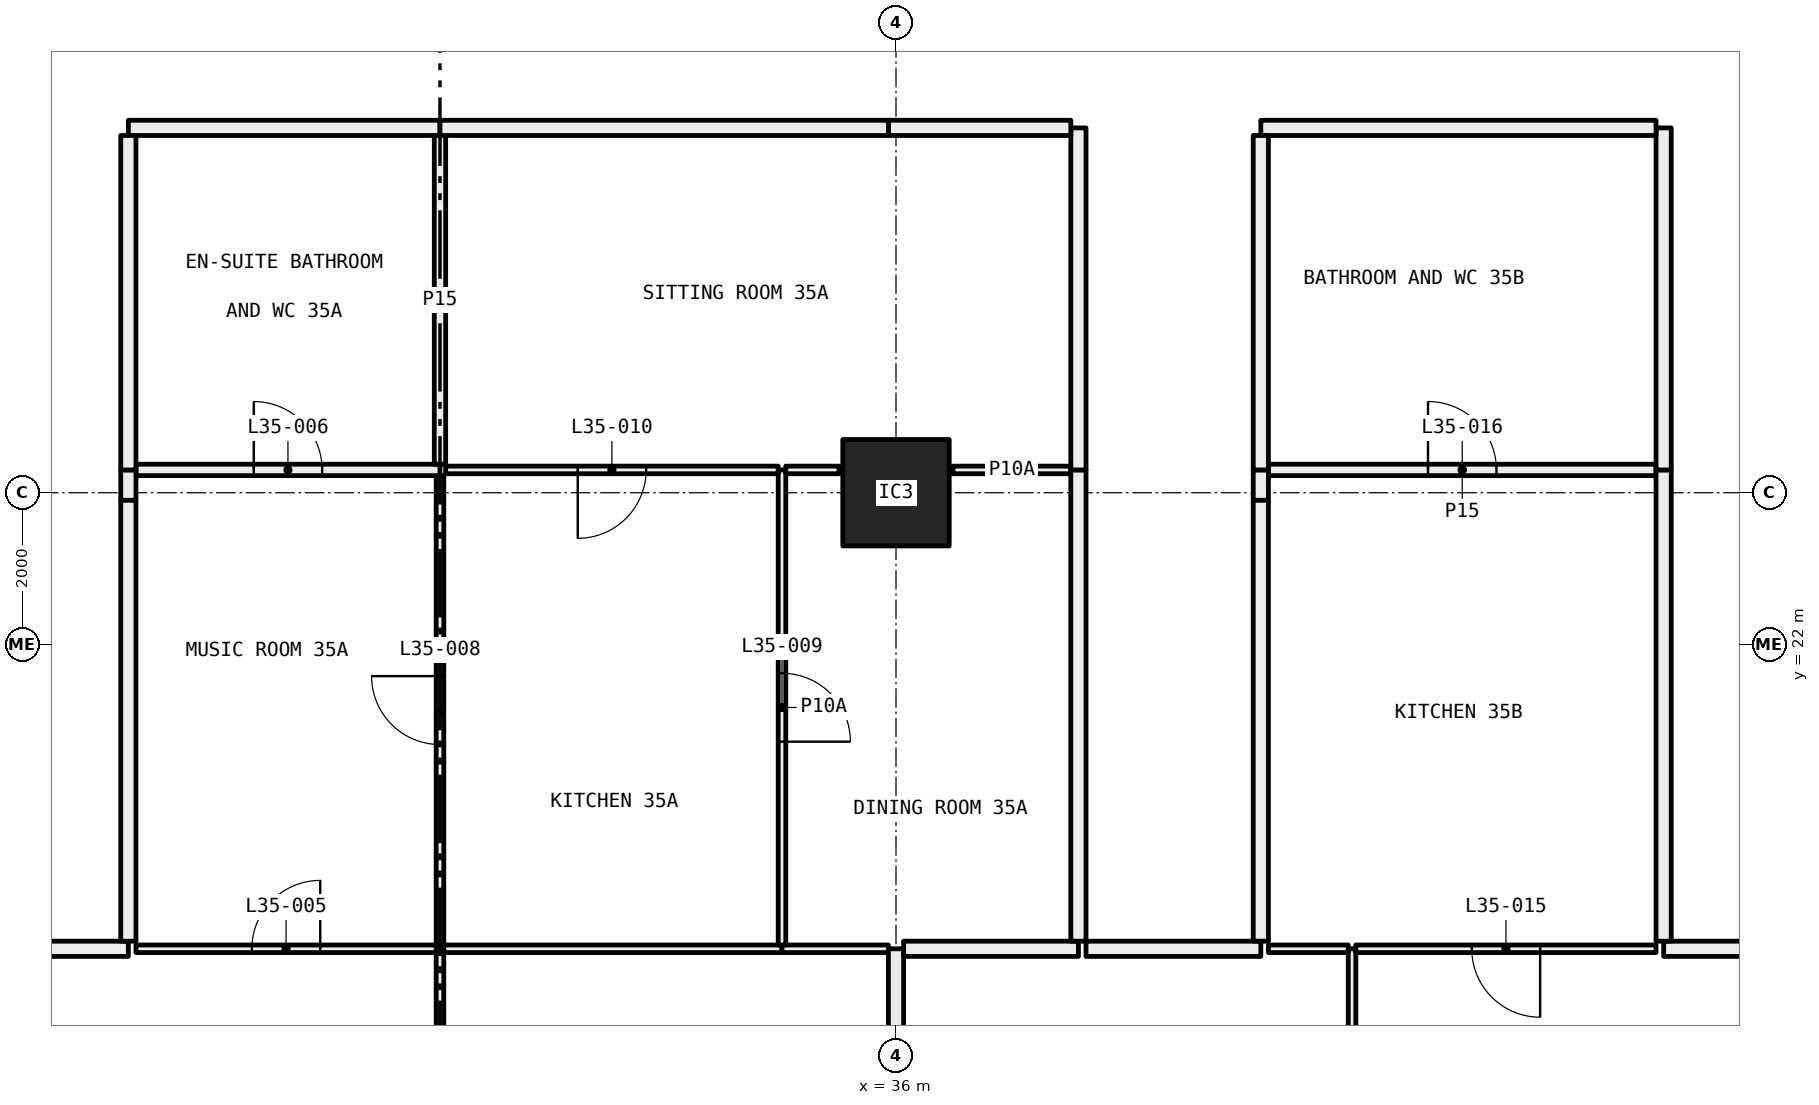
"""IFC4 building model, lengths in metres.
Left out: names, types, materials, properties, quantities, classifications, styles, units other than length and angle.
Written with IfcOpenShell. Run it as: python <this file> out.ifc"""

import sys

from ifc_helpers import new_model, si_unit, direction, frame, frame_2d, origin, origin_2d, place, context, subcontext, project, spatial, rectangle, hollow_rectangle, extrude, element, fill, save


model = new_model("IFC4")
c1 = context("Model", 3, precision=1e-05, world=origin(), true_north=direction((0.0, 1.0)))
c2 = subcontext(c1, "Body", "Model", "MODEL_VIEW")
j1 = project(units=[si_unit("LENGTHUNIT", "METRE"), si_unit("PLANEANGLEUNIT", "RADIAN")], contexts=[c1])
p1 = place(None, origin())
s1 = spatial("IfcSite", under=j1, at=p1, CompositionType="ELEMENT")
p2 = place(p1, origin())
s2 = spatial("IfcBuilding", under=s1, at=p2, CompositionType="ELEMENT")
p3 = place(p2, frame((0.0, 0.0, 134.55)))
s3 = spatial("IfcBuildingStorey", under=s2, at=p3, CompositionType="ELEMENT", Elevation=134.55)
p4 = place(p3, frame((36.0, 24.0, 0.0), z_axis=(0.0, 0.0, 1.0), x_axis=(1.0, 0.0, 0.0)))
e1 = element("IfcColumn", 1, at=p4, inside=s3, PredefinedType="COLUMN", context=c2, shape_type="SweptSolid", body=[
    extrude(hollow_rectangle(XDim=1.4, YDim=1.4, WallThickness=0.06, at=origin_2d()), origin(), (0.0, 0.0, 1.0), 3.05),
])
p5 = place(p3, frame((30.0, 12.72, 0.0), z_axis=(0.0, 0.0, 1.0), x_axis=(0.0, 1.0, 0.0)))
e2 = element("IfcWall", 2, at=p5, inside=s3, PredefinedType="PARTITIONING", context=c2, shape_type="SweptSolid", body=[
    extrude(rectangle(XDim=5.28, YDim=0.1, at=frame_2d((2.64, 0.0))), origin(), (0.0, 0.0, 1.0), 3.05),
])
p6 = place(p5, frame((2.19, 0.0, 0.0)))
e3 = element("IfcOpeningElement", 3, at=p6, cuts=e2, PredefinedType="OPENING", context=c2, shape_type="SweptSolid", body=[
    extrude(rectangle(XDim=0.9, YDim=2.1, at=frame_2d((0.45, 1.05))), frame((0.0, 0.06, 0.0), z_axis=(0.0, -1.0, 0.0), x_axis=(1.0, 0.0, 0.0)), (0.0, 0.0, 1.0), 0.12),
])
p7 = place(p3, frame((29.95, 18.0, 0.0), z_axis=(0.0, 0.0, 1.0), x_axis=(-1.0, 0.0, 0.0)))
e4 = element("IfcWall", 4, at=p7, inside=s3, PredefinedType="PARTITIONING", context=c2, shape_type="SweptSolid", body=[
    extrude(rectangle(XDim=3.95, YDim=0.1, at=frame_2d((1.975, 0.0))), origin(), (0.0, 0.0, 1.0), 3.05),
])
p8 = place(p7, frame((1.525, 0.0, 0.0)))
e5 = element("IfcOpeningElement", 5, at=p8, cuts=e4, PredefinedType="OPENING", context=c2, shape_type="SweptSolid", body=[
    extrude(rectangle(XDim=0.9, YDim=2.1, at=frame_2d((0.45, 1.05))), frame((0.0, 0.06, 0.0), z_axis=(0.0, -1.0, 0.0), x_axis=(1.0, 0.0, 0.0)), (0.0, 0.0, 1.0), 0.12),
])
p9 = place(p3, frame((25.9, 18.0, 0.0), z_axis=(0.0, 0.0, 1.0), x_axis=(-1.0, 0.0, 0.0)))
e6 = element("IfcWall", 6, at=p9, inside=s3, PredefinedType="PARTITIONING", context=c2, shape_type="SweptSolid", body=[
    extrude(rectangle(XDim=1.9, YDim=0.2, at=frame_2d((0.95, 0.0))), origin(), (0.0, 0.0, 1.0), 3.05),
])
p10 = place(p3, frame((34.5, 18.0, 0.0), z_axis=(0.0, 0.0, 1.0), x_axis=(-1.0, 0.0, 0.0)))
e7 = element("IfcWall", 7, at=p10, inside=s3, PredefinedType="PARTITIONING", context=c2, shape_type="SweptSolid", body=[
    extrude(rectangle(XDim=4.45, YDim=0.1, at=frame_2d((2.225, 0.0))), origin(), (0.0, 0.0, 1.0), 3.05),
])
p11 = place(p3, frame((35.9, 18.0, 0.0), z_axis=(0.0, 0.0, 1.0), x_axis=(-1.0, 0.0, 0.0)))
e8 = element("IfcWall", 8, at=p11, inside=s3, PredefinedType="PARTITIONING", context=c2, shape_type="SweptSolid", body=[
    extrude(rectangle(XDim=1.4, YDim=0.1, at=frame_2d((0.7, 0.0))), origin(), (0.0, 0.0, 1.0), 3.05),
])
p12 = place(p3, frame((36.0, 12.72, 0.0), z_axis=(0.0, 0.0, 1.0), x_axis=(0.0, 1.0, 0.0)))
e9 = element("IfcWall", 9, at=p12, inside=s3, PredefinedType="PARTITIONING", context=c2, shape_type="SweptSolid", body=[
    extrude(rectangle(XDim=5.28, YDim=0.2, at=frame_2d((2.64, 0.0))), origin(), (0.0, 0.0, 1.0), 2.45),
])
p13 = place(p3, frame((30.0, 18.05, 0.0), z_axis=(0.0, 0.0, 1.0), x_axis=(0.0, 1.0, 0.0)))
e10 = element("IfcWall", 10, at=p13, inside=s3, PredefinedType="PARTITIONING", context=c2, shape_type="SweptSolid", body=[
    extrude(rectangle(XDim=6.175, YDim=0.1, at=frame_2d((3.087, 0.0))), origin(), (0.0, 0.0, 1.0), 2.45),
])
p14 = place(p13, frame((2.637, 0.0, 0.0)))
e11 = element("IfcOpeningElement", 11, at=p14, cuts=e10, PredefinedType="OPENING", context=c2, shape_type="SweptSolid", body=[
    extrude(rectangle(XDim=0.9, YDim=2.1, at=frame_2d((0.45, 1.05))), frame((0.0, 0.06, 0.0), z_axis=(0.0, -1.0, 0.0), x_axis=(1.0, 0.0, 0.0)), (0.0, 0.0, 1.0), 0.12),
])
p15 = place(p3, frame((30.0, 24.3, 0.0), z_axis=(0.0, 0.0, 1.0), x_axis=(-1.0, 0.0, 0.0)))
e12 = element("IfcWall", 12, at=p15, inside=s3, PredefinedType="PARTITIONING", context=c2, shape_type="SweptSolid", body=[
    extrude(rectangle(XDim=4.0, YDim=0.15, at=frame_2d((2.0, 0.0))), origin(), (0.0, 0.0, 1.0), 3.05),
])
p16 = place(p15, frame((1.55, 0.0, 0.0)))
e13 = element("IfcOpeningElement", 13, at=p16, cuts=e12, PredefinedType="OPENING", context=c2, shape_type="SweptSolid", body=[
    extrude(rectangle(XDim=0.9, YDim=2.1, at=frame_2d((0.45, 1.05))), frame((0.0, 0.085, 0.0), z_axis=(0.0, -1.0, 0.0), x_axis=(1.0, 0.0, 0.0)), (0.0, 0.0, 1.0), 0.17),
])
p17 = place(p3, frame((25.9, 24.3, 0.0), z_axis=(0.0, 0.0, 1.0), x_axis=(0.0, -1.0, 0.0)))
e14 = element("IfcWall", 14, at=p17, inside=s3, PredefinedType="PARTITIONING", context=c2, shape_type="SweptSolid", body=[
    extrude(rectangle(XDim=0.4, YDim=0.2, at=frame_2d((0.2, 0.0))), origin(), (0.0, 0.0, 1.0), 2.45),
])
p18 = place(p3, frame((25.9, 23.9, 0.0), z_axis=(0.0, 0.0, 1.0), x_axis=(0.0, -1.0, 0.0)))
e15 = element("IfcWall", 15, at=p18, inside=s3, PredefinedType="PARTITIONING", context=c2, shape_type="SweptSolid", body=[
    extrude(rectangle(XDim=5.8, YDim=0.2, at=frame_2d((2.9, 0.0))), origin(), (0.0, 0.0, 1.0), 3.05),
])
p19 = place(p3, frame((34.5, 18.05, 0.0), z_axis=(0.0, 0.0, 1.0), x_axis=(0.0, 1.0, 0.0)))
e16 = element("IfcWall", 16, at=p19, inside=s3, PredefinedType="PARTITIONING", context=c2, shape_type="SweptSolid", body=[
    extrude(rectangle(XDim=6.25, YDim=0.1, at=frame_2d((3.125, 0.0))), origin(), (0.0, 0.0, 1.0), 2.45),
])
p20 = place(p19, frame((2.675, 0.0, 0.0)))
e17 = element("IfcOpeningElement", 17, at=p20, cuts=e16, PredefinedType="OPENING", context=c2, shape_type="SweptSolid", body=[
    extrude(rectangle(XDim=0.9, YDim=2.1, at=frame_2d((0.45, 1.05))), frame((0.0, 0.06, 0.0), z_axis=(0.0, -1.0, 0.0), x_axis=(1.0, 0.0, 0.0)), (0.0, 0.0, 1.0), 0.12),
])
p21 = place(p3, frame((34.45, 24.3, 0.0), z_axis=(0.0, 0.0, 1.0), x_axis=(-1.0, 0.0, 0.0)))
e18 = element("IfcWall", 18, at=p21, inside=s3, PredefinedType="PARTITIONING", context=c2, shape_type="SweptSolid", body=[
    extrude(rectangle(XDim=4.375, YDim=0.1, at=frame_2d((2.188, 0.0))), origin(), (0.0, 0.0, 1.0), 3.05),
])
p22 = place(p21, frame((1.738, 0.0, 0.0)))
e19 = element("IfcOpeningElement", 19, at=p22, cuts=e18, PredefinedType="OPENING", context=c2, shape_type="SweptSolid", body=[
    extrude(rectangle(XDim=0.9, YDim=2.1, at=frame_2d((0.45, 1.05))), frame((0.0, 0.06, 0.0), z_axis=(0.0, -1.0, 0.0), x_axis=(1.0, 0.0, 0.0)), (0.0, 0.0, 1.0), 0.12),
])
p23 = place(p3, frame((35.25, 24.3, 0.0), z_axis=(0.0, 0.0, 1.0), x_axis=(-1.0, 0.0, 0.0)))
e20 = element("IfcWall", 20, at=p23, inside=s3, PredefinedType="PARTITIONING", context=c2, shape_type="SweptSolid", body=[
    extrude(rectangle(XDim=0.7, YDim=0.1, at=frame_2d((0.35, 0.0))), origin(), (0.0, 0.0, 1.0), 3.05),
])
p24 = place(p3, frame((38.3, 24.3, 0.0), z_axis=(0.0, 0.0, 1.0), x_axis=(-1.0, 0.0, 0.0)))
e21 = element("IfcWall", 21, at=p24, inside=s3, PredefinedType="PARTITIONING", context=c2, shape_type="SweptSolid", body=[
    extrude(rectangle(XDim=1.55, YDim=0.1, at=frame_2d((0.775, 0.0))), origin(), (0.0, 0.0, 1.0), 3.05),
])
p25 = place(p3, frame((36.1, 18.0, 0.0), z_axis=(0.0, 0.0, 1.0), x_axis=(1.0, 0.0, 0.0)))
e22 = element("IfcWall", 22, at=p25, inside=s3, PredefinedType="PARTITIONING", context=c2, shape_type="SweptSolid", body=[
    extrude(rectangle(XDim=2.3, YDim=0.2, at=frame_2d((1.15, 0.0))), origin(), (0.0, 0.0, 1.0), 3.05),
])
p26 = place(p3, frame((38.4, 18.1, 0.0), z_axis=(0.0, 0.0, 1.0), x_axis=(0.0, 1.0, 0.0)))
e23 = element("IfcWall", 23, at=p26, inside=s3, PredefinedType="PARTITIONING", context=c2, shape_type="SweptSolid", body=[
    extrude(rectangle(XDim=6.2, YDim=0.2, at=frame_2d((3.1, 0.0))), origin(), (0.0, 0.0, 1.0), 2.45),
])
p27 = place(p3, frame((30.0, 24.375, 0.0), z_axis=(0.0, 0.0, 1.0), x_axis=(0.0, 1.0, 0.0)))
e24 = element("IfcWall", 24, at=p27, inside=s3, PredefinedType="PARTITIONING", context=c2, shape_type="SweptSolid", body=[
    extrude(rectangle(XDim=4.325, YDim=0.15, at=frame_2d((2.163, 0.0))), origin(), (0.0, 0.0, 1.0), 3.05),
])
p28 = place(p3, frame((30.0, 28.8, 0.0), z_axis=(0.0, 0.0, 1.0), x_axis=(-1.0, 0.0, 0.0)))
e25 = element("IfcWall", 25, at=p28, inside=s3, PredefinedType="PARTITIONING", context=c2, shape_type="SweptSolid", body=[
    extrude(rectangle(XDim=4.1, YDim=0.2, at=frame_2d((2.05, 0.0))), origin(), (0.0, 0.0, 1.0), 3.05),
])
p29 = place(p3, frame((25.9, 28.7, 0.0), z_axis=(0.0, 0.0, 1.0), x_axis=(0.0, -1.0, 0.0)))
e26 = element("IfcWall", 26, at=p29, inside=s3, PredefinedType="PARTITIONING", context=c2, shape_type="SweptSolid", body=[
    extrude(rectangle(XDim=4.4, YDim=0.2, at=frame_2d((2.2, 0.0))), origin(), (0.0, 0.0, 1.0), 3.05),
])
p30 = place(p3, frame((38.4, 24.3, 0.0), z_axis=(0.0, 0.0, 1.0), x_axis=(0.0, 1.0, 0.0)))
e27 = element("IfcWall", 27, at=p30, inside=s3, PredefinedType="PARTITIONING", context=c2, shape_type="SweptSolid", body=[
    extrude(rectangle(XDim=4.5, YDim=0.2, at=frame_2d((2.25, 0.0))), origin(), (0.0, 0.0, 1.0), 3.05),
])
p31 = place(p3, frame((38.3, 28.8, 0.0), z_axis=(0.0, 0.0, 1.0), x_axis=(-1.0, 0.0, 0.0)))
e28 = element("IfcWall", 28, at=p31, inside=s3, PredefinedType="PARTITIONING", context=c2, shape_type="SweptSolid", body=[
    extrude(rectangle(XDim=2.4, YDim=0.2, at=frame_2d((1.2, 0.0))), origin(), (0.0, 0.0, 1.0), 2.45),
])
p32 = place(p3, frame((35.9, 28.8, 0.0), z_axis=(0.0, 0.0, 1.0), x_axis=(-1.0, 0.0, 0.0)))
e29 = element("IfcWall", 29, at=p32, inside=s3, PredefinedType="PARTITIONING", context=c2, shape_type="SweptSolid", body=[
    extrude(rectangle(XDim=5.9, YDim=0.2, at=frame_2d((2.95, 0.0))), origin(), (0.0, 0.0, 1.0), 3.05),
])
p33 = place(p3, frame((42.0, 12.72, 0.0), z_axis=(0.0, 0.0, 1.0), x_axis=(0.0, 1.0, 0.0)))
e30 = element("IfcWall", 30, at=p33, inside=s3, PredefinedType="PARTITIONING", context=c2, shape_type="SweptSolid", body=[
    extrude(rectangle(XDim=5.28, YDim=0.1, at=frame_2d((2.64, 0.0))), origin(), (0.0, 0.0, 1.0), 3.05),
])
p34 = place(p33, frame((2.19, 0.0, 0.0)))
e31 = element("IfcOpeningElement", 31, at=p34, cuts=e30, PredefinedType="OPENING", context=c2, shape_type="SweptSolid", body=[
    extrude(rectangle(XDim=0.9, YDim=2.1, at=frame_2d((0.45, 1.05))), frame((0.0, 0.06, 0.0), z_axis=(0.0, -1.0, 0.0), x_axis=(1.0, 0.0, 0.0)), (0.0, 0.0, 1.0), 0.12),
])
p35 = place(p3, frame((41.95, 18.0, 0.0), z_axis=(0.0, 0.0, 1.0), x_axis=(-1.0, 0.0, 0.0)))
e32 = element("IfcWall", 32, at=p35, inside=s3, PredefinedType="PARTITIONING", context=c2, shape_type="SweptSolid", body=[
    extrude(rectangle(XDim=1.05, YDim=0.1, at=frame_2d((0.525, 0.0))), origin(), (0.0, 0.0, 1.0), 3.05),
])
p36 = place(p3, frame((40.8, 18.0, 0.0), z_axis=(0.0, 0.0, 1.0), x_axis=(-1.0, 0.0, 0.0)))
e33 = element("IfcWall", 33, at=p36, inside=s3, PredefinedType="PARTITIONING", context=c2, shape_type="SweptSolid", body=[
    extrude(rectangle(XDim=2.3, YDim=0.2, at=frame_2d((1.15, 0.0))), origin(), (0.0, 0.0, 1.0), 3.05),
])
p37 = place(p3, frame((46.0, 18.0, 0.0), z_axis=(0.0, 0.0, 1.0), x_axis=(-1.0, 0.0, 0.0)))
e34 = element("IfcWall", 34, at=p37, inside=s3, PredefinedType="PARTITIONING", context=c2, shape_type="SweptSolid", body=[
    extrude(rectangle(XDim=3.95, YDim=0.1, at=frame_2d((1.975, 0.0))), origin(), (0.0, 0.0, 1.0), 3.05),
])
p38 = place(p37, frame((1.525, 0.0, 0.0)))
e35 = element("IfcOpeningElement", 35, at=p38, cuts=e34, PredefinedType="OPENING", context=c2, shape_type="SweptSolid", body=[
    extrude(rectangle(XDim=0.9, YDim=2.1, at=frame_2d((0.45, 1.05))), frame((0.0, 0.06, 0.0), z_axis=(0.0, -1.0, 0.0), x_axis=(1.0, 0.0, 0.0)), (0.0, 0.0, 1.0), 0.12),
])
p39 = place(p3, frame((48.0, 18.0, 0.0), z_axis=(0.0, 0.0, 1.0), x_axis=(-1.0, 0.0, 0.0)))
e36 = element("IfcWall", 36, at=p39, inside=s3, PredefinedType="PARTITIONING", context=c2, shape_type="SweptSolid", body=[
    extrude(rectangle(XDim=1.9, YDim=0.2, at=frame_2d((0.95, 0.0))), origin(), (0.0, 0.0, 1.0), 3.05),
])
p40 = place(p3, frame((46.0, 24.3, 0.0), z_axis=(0.0, 0.0, 1.0), x_axis=(-1.0, 0.0, 0.0)))
e37 = element("IfcWall", 37, at=p40, inside=s3, PredefinedType="PARTITIONING", context=c2, shape_type="SweptSolid", body=[
    extrude(rectangle(XDim=5.1, YDim=0.15, at=frame_2d((2.55, 0.0))), origin(), (0.0, 0.0, 1.0), 3.05),
])
p41 = place(p40, frame((2.1, 0.0, 0.0)))
e38 = element("IfcOpeningElement", 38, at=p41, cuts=e37, PredefinedType="OPENING", context=c2, shape_type="SweptSolid", body=[
    extrude(rectangle(XDim=0.9, YDim=2.1, at=frame_2d((0.45, 1.05))), frame((0.0, 0.085, 0.0), z_axis=(0.0, -1.0, 0.0), x_axis=(1.0, 0.0, 0.0)), (0.0, 0.0, 1.0), 0.17),
])
p42 = place(p3, frame((40.8, 24.3, 0.0), z_axis=(0.0, 0.0, 1.0), x_axis=(0.0, -1.0, 0.0)))
e39 = element("IfcWall", 39, at=p42, inside=s3, PredefinedType="PARTITIONING", context=c2, shape_type="SweptSolid", body=[
    extrude(rectangle(XDim=0.4, YDim=0.2, at=frame_2d((0.2, 0.0))), origin(), (0.0, 0.0, 1.0), 2.45),
])
p43 = place(p3, frame((40.8, 23.9, 0.0), z_axis=(0.0, 0.0, 1.0), x_axis=(0.0, -1.0, 0.0)))
e40 = element("IfcWall", 40, at=p43, inside=s3, PredefinedType="PARTITIONING", context=c2, shape_type="SweptSolid", body=[
    extrude(rectangle(XDim=5.8, YDim=0.2, at=frame_2d((2.9, 0.0))), origin(), (0.0, 0.0, 1.0), 3.05),
])
p44 = place(p3, frame((46.1, 18.1, 0.0), z_axis=(0.0, 0.0, 1.0), x_axis=(0.0, 1.0, 0.0)))
e41 = element("IfcWall", 41, at=p44, inside=s3, PredefinedType="PARTITIONING", context=c2, shape_type="SweptSolid", body=[
    extrude(rectangle(XDim=6.2, YDim=0.2, at=frame_2d((3.1, 0.0))), origin(), (0.0, 0.0, 1.0), 2.45),
])
p45 = place(p3, frame((46.1, 24.3, 0.0), z_axis=(0.0, 0.0, 1.0), x_axis=(0.0, 1.0, 0.0)))
e42 = element("IfcWall", 42, at=p45, inside=s3, PredefinedType="PARTITIONING", context=c2, shape_type="SweptSolid", body=[
    extrude(rectangle(XDim=4.5, YDim=0.2, at=frame_2d((2.25, 0.0))), origin(), (0.0, 0.0, 1.0), 3.05),
])
p46 = place(p3, frame((46.0, 28.8, 0.0), z_axis=(0.0, 0.0, 1.0), x_axis=(-1.0, 0.0, 0.0)))
e43 = element("IfcWall", 43, at=p46, inside=s3, PredefinedType="PARTITIONING", context=c2, shape_type="SweptSolid", body=[
    extrude(rectangle(XDim=5.2, YDim=0.2, at=frame_2d((2.6, 0.0))), origin(), (0.0, 0.0, 1.0), 3.05),
])
p47 = place(p3, frame((40.8, 28.7, 0.0), z_axis=(0.0, 0.0, 1.0), x_axis=(0.0, -1.0, 0.0)))
e44 = element("IfcWall", 44, at=p47, inside=s3, PredefinedType="PARTITIONING", context=c2, shape_type="SweptSolid", body=[
    extrude(rectangle(XDim=4.4, YDim=0.2, at=frame_2d((2.2, 0.0))), origin(), (0.0, 0.0, 1.0), 3.05),
])
p48 = place(p8, frame((0.9, 0.0, 0.0), x_axis=(-1.0, 0.0, 0.0)))
e45 = element("IfcDoor", 45, at=p48, inside=s3, OperationType="SINGLE_SWING_LEFT", PredefinedType="DOOR", context=c2, shape_type="SweptSolid", body=[
    extrude(rectangle(XDim=0.9, YDim=2.1, at=frame_2d((0.45, 1.05))), frame((0.0, 0.025, 0.0), z_axis=(0.0, -1.0, 0.0), x_axis=(1.0, 0.0, 0.0)), (0.0, 0.0, 1.0), 0.05),
])
fill(e5, e45)
p49 = place(p16, frame((0.9, 0.0, 0.0), x_axis=(-1.0, 0.0, 0.0)))
e46 = element("IfcDoor", 46, at=p49, inside=s3, OperationType="SINGLE_SWING_RIGHT", PredefinedType="DOOR", context=c2, shape_type="SweptSolid", body=[
    extrude(rectangle(XDim=0.9, YDim=2.1, at=frame_2d((0.45, 1.05))), frame((0.0, 0.025, 0.0), z_axis=(0.0, -1.0, 0.0), x_axis=(1.0, 0.0, 0.0)), (0.0, 0.0, 1.0), 0.05),
])
fill(e13, e46)
p50 = place(p14, origin())
e47 = element("IfcDoor", 47, at=p50, inside=s3, OperationType="SINGLE_SWING_LEFT", PredefinedType="DOOR", context=c2, shape_type="SweptSolid", body=[
    extrude(rectangle(XDim=0.9, YDim=2.1, at=frame_2d((0.45, 1.05))), frame((0.0, 0.025, 0.0), z_axis=(0.0, -1.0, 0.0), x_axis=(1.0, 0.0, 0.0)), (0.0, 0.0, 1.0), 0.05),
])
fill(e11, e47)
p51 = place(p20, frame((0.9, 0.0, 0.0), x_axis=(-1.0, 0.0, 0.0)))
e48 = element("IfcDoor", 48, at=p51, inside=s3, OperationType="SINGLE_SWING_LEFT", PredefinedType="DOOR", context=c2, shape_type="SweptSolid", body=[
    extrude(rectangle(XDim=0.9, YDim=2.1, at=frame_2d((0.45, 1.05))), frame((0.0, 0.025, 0.0), z_axis=(0.0, -1.0, 0.0), x_axis=(1.0, 0.0, 0.0)), (0.0, 0.0, 1.0), 0.05),
])
fill(e17, e48)
p52 = place(p22, origin())
e49 = element("IfcDoor", 49, at=p52, inside=s3, OperationType="SINGLE_SWING_LEFT", PredefinedType="DOOR", context=c2, shape_type="SweptSolid", body=[
    extrude(rectangle(XDim=0.9, YDim=2.1, at=frame_2d((0.45, 1.05))), frame((0.0, 0.025, 0.0), z_axis=(0.0, -1.0, 0.0), x_axis=(1.0, 0.0, 0.0)), (0.0, 0.0, 1.0), 0.05),
])
fill(e19, e49)
p53 = place(p38, origin())
e50 = element("IfcDoor", 50, at=p53, inside=s3, OperationType="SINGLE_SWING_RIGHT", PredefinedType="DOOR", context=c2, shape_type="SweptSolid", body=[
    extrude(rectangle(XDim=0.9, YDim=2.1, at=frame_2d((0.45, 1.05))), frame((0.0, 0.025, 0.0), z_axis=(0.0, -1.0, 0.0), x_axis=(1.0, 0.0, 0.0)), (0.0, 0.0, 1.0), 0.05),
])
fill(e35, e50)
p54 = place(p41, frame((0.9, 0.0, 0.0), x_axis=(-1.0, 0.0, 0.0)))
e51 = element("IfcDoor", 51, at=p54, inside=s3, OperationType="SINGLE_SWING_RIGHT", PredefinedType="DOOR", context=c2, shape_type="SweptSolid", body=[
    extrude(rectangle(XDim=0.9, YDim=2.1, at=frame_2d((0.45, 1.05))), frame((0.0, 0.025, 0.0), z_axis=(0.0, -1.0, 0.0), x_axis=(1.0, 0.0, 0.0)), (0.0, 0.0, 1.0), 0.05),
])
fill(e38, e51)
save(model, sys.argv[1])
